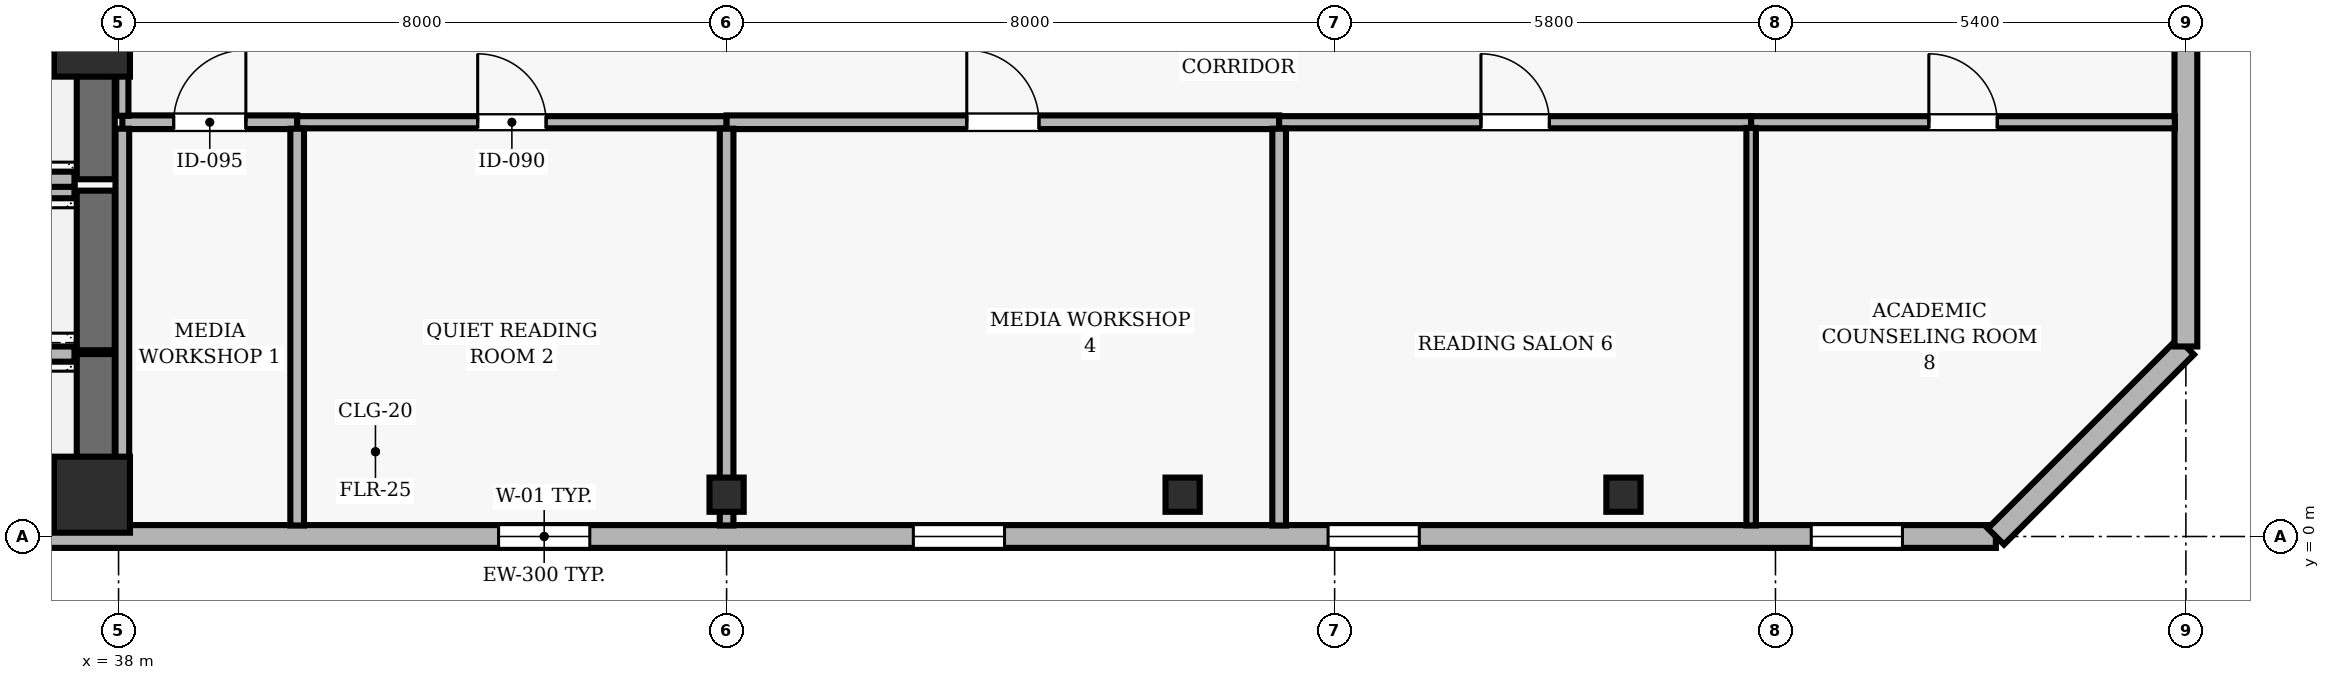
"""IFC4 building model, lengths in metres.
Left out: names, types, materials, properties, quantities, classifications, styles, units other than length and angle.
Written with IfcOpenShell. Run it as: python <this file> out.ifc"""

import sys

from ifc_helpers import new_model, si_unit, direction, frame, frame_2d, origin, origin_2d, place, context, subcontext, project, spatial, rectangle, hollow_rectangle, extrude, element, fill, save


model = new_model("IFC4")
c1 = context("Model", 3, precision=1e-05, world=origin(), true_north=direction((0.0, 1.0)))
c2 = subcontext(c1, "Body", "Model", "MODEL_VIEW")
j1 = project(units=[si_unit("LENGTHUNIT", "METRE"), si_unit("PLANEANGLEUNIT", "RADIAN")], contexts=[c1])
p1 = place(None, origin())
s1 = spatial("IfcSite", under=j1, at=p1, CompositionType="ELEMENT")
p2 = place(p1, origin())
s2 = spatial("IfcBuilding", under=s1, at=p2, CompositionType="ELEMENT")
p3 = place(p2, frame((0.0, 0.0, 199.2)))
s3 = spatial("IfcBuildingStorey", under=s2, at=p3, CompositionType="ELEMENT", Elevation=199.2)
for number, where, z_axis, x_axis in (
    (1, (37.65, 0.55, 0.0), (0.0, 0.0, 1.0), (1.0, 0.0, 0.0)),
    (2, (37.65, 6.55, 0.0), (0.0, 0.0, 1.0), (1.0, 0.0, 0.0)),
):
    element("IfcColumn", number, at=place(p3, frame(where, z_axis=z_axis, x_axis=x_axis)), inside=s3, PredefinedType="COLUMN", context=c2, shape_type="SweptSolid", body=[
        extrude(rectangle(XDim=1.0, YDim=1.0, at=origin_2d()), origin(), (0.0, 0.0, 1.0), 3.9),
    ])
for number, where, z_axis, x_axis in (
    (3, (46.0, 0.55, 0.0), (0.0, 0.0, 1.0), (1.0, 0.0, 0.0)),
    (4, (52.0, 0.55, 0.0), (0.0, 0.0, 1.0), (1.0, 0.0, 0.0)),
    (5, (57.8, 0.55, 0.0), (0.0, 0.0, 1.0), (1.0, 0.0, 0.0)),
):
    element("IfcColumn", number, at=place(p3, frame(where, z_axis=z_axis, x_axis=x_axis)), inside=s3, PredefinedType="COLUMN", context=c2, shape_type="SweptSolid", body=[
        extrude(hollow_rectangle(XDim=0.45, YDim=0.45, WallThickness=0.02, at=origin_2d()), origin(), (0.0, 0.0, 1.0), 3.9),
    ])
p4 = place(p3, frame((24.5, 0.0, 0.0), z_axis=(0.0, 0.0, 1.0), x_axis=(1.0, 0.0, 0.0)))
e6 = element("IfcWall", 6, at=p4, inside=s3, PredefinedType="SOLIDWALL", context=c2, shape_type="SweptSolid", body=[
    extrude(rectangle(XDim=38.2, YDim=0.3, at=frame_2d((19.1, 0.0))), origin(), (0.0, 0.0, 1.0), 3.69),
])
p5 = place(p4, frame((2.129, 0.0, 0.9)))
e7 = element("IfcOpeningElement", 7, at=p5, cuts=e6, PredefinedType="OPENING", context=c2, shape_type="SweptSolid", body=[
    extrude(rectangle(XDim=1.2, YDim=1.6, at=frame_2d((0.6, 0.8))), frame((0.0, 0.16, 0.0), z_axis=(0.0, -1.0, 0.0), x_axis=(1.0, 0.0, 0.0)), (0.0, 0.0, 1.0), 0.32),
])
p6 = place(p4, frame((8.036, 0.0, 0.9)))
e8 = element("IfcOpeningElement", 8, at=p6, cuts=e6, PredefinedType="OPENING", context=c2, shape_type="SweptSolid", body=[
    extrude(rectangle(XDim=1.2, YDim=1.6, at=frame_2d((0.6, 0.8))), frame((0.0, 0.16, 0.0), z_axis=(0.0, -1.0, 0.0), x_axis=(1.0, 0.0, 0.0)), (0.0, 0.0, 1.0), 0.32),
])
p7 = place(p4, frame((18.5, 0.0, 0.9)))
e9 = element("IfcOpeningElement", 9, at=p7, cuts=e6, PredefinedType="OPENING", context=c2, shape_type="SweptSolid", body=[
    extrude(rectangle(XDim=1.2, YDim=1.6, at=frame_2d((0.6, 0.8))), frame((0.0, 0.16, 0.0), z_axis=(0.0, -1.0, 0.0), x_axis=(1.0, 0.0, 0.0)), (0.0, 0.0, 1.0), 0.32),
])
p8 = place(p4, frame((23.957, 0.0, 0.9)))
e10 = element("IfcOpeningElement", 10, at=p8, cuts=e6, PredefinedType="OPENING", context=c2, shape_type="SweptSolid", body=[
    extrude(rectangle(XDim=1.2, YDim=1.6, at=frame_2d((0.6, 0.8))), frame((0.0, 0.16, 0.0), z_axis=(0.0, -1.0, 0.0), x_axis=(1.0, 0.0, 0.0)), (0.0, 0.0, 1.0), 0.32),
])
p9 = place(p4, frame((29.414, 0.0, 0.9)))
e11 = element("IfcOpeningElement", 11, at=p9, cuts=e6, PredefinedType="OPENING", context=c2, shape_type="SweptSolid", body=[
    extrude(rectangle(XDim=1.2, YDim=1.6, at=frame_2d((0.6, 0.8))), frame((0.0, 0.16, 0.0), z_axis=(0.0, -1.0, 0.0), x_axis=(1.0, 0.0, 0.0)), (0.0, 0.0, 1.0), 0.32),
])
p10 = place(p4, frame((35.771, 0.0, 0.9)))
e12 = element("IfcOpeningElement", 12, at=p10, cuts=e6, PredefinedType="OPENING", context=c2, shape_type="SweptSolid", body=[
    extrude(rectangle(XDim=1.2, YDim=1.6, at=frame_2d((0.6, 0.8))), frame((0.0, 0.16, 0.0), z_axis=(0.0, -1.0, 0.0), x_axis=(1.0, 0.0, 0.0)), (0.0, 0.0, 1.0), 0.32),
])
p11 = place(p3, frame((62.7, 0.0, 0.0), z_axis=(0.0, 0.0, 1.0), x_axis=(0.707106781187, 0.707106781187, 0.0)))
e13 = element("IfcWall", 13, at=p11, inside=s3, PredefinedType="SOLIDWALL", context=c2, shape_type="SweptSolid", body=[
    extrude(rectangle(XDim=3.536, YDim=0.3, at=frame_2d((1.768, 0.0))), origin(), (0.0, 0.0, 1.0), 3.69),
])
p12 = place(p3, frame((65.2, 2.5, 0.0), z_axis=(0.0, 0.0, 1.0), x_axis=(0.0, 1.0, 0.0)))
e14 = element("IfcWall", 14, at=p12, inside=s3, PredefinedType="SOLIDWALL", context=c2, shape_type="SweptSolid", body=[
    extrude(rectangle(XDim=11.0, YDim=0.3, at=frame_2d((5.5, 0.0))), origin(), (0.0, 0.0, 1.0), 3.69),
])
p13 = place(p12, frame((7.35, 0.0, 0.9)))
e15 = element("IfcOpeningElement", 15, at=p13, cuts=e14, PredefinedType="OPENING", context=c2, shape_type="SweptSolid", body=[
    extrude(rectangle(XDim=1.8, YDim=1.6, at=frame_2d((0.9, 0.8))), frame((0.0, 0.16, 0.0), z_axis=(0.0, -1.0, 0.0), x_axis=(1.0, 0.0, 0.0)), (0.0, 0.0, 1.0), 0.32),
])
p14 = place(p3, frame((37.7, 0.3, 0.0), z_axis=(0.0, 0.0, 1.0), x_axis=(0.0, 1.0, 0.0)))
e16 = element("IfcWall", 16, at=p14, inside=s3, PredefinedType="SHEAR", context=c2, shape_type="SweptSolid", body=[
    extrude(rectangle(XDim=2.1, YDim=0.5, at=frame_2d((1.05, 0.0))), origin(), (0.0, 0.0, 1.0), 3.69),
])
for number, where, z_axis, x_axis in (
    (17, (35.28, 0.3, 0.0), (0.0, 0.0, 1.0), (1.0, 0.0, 0.0)),
    (18, (37.42, 2.4, 0.0), (0.0, 0.0, 1.0), (-1.0, 0.0, 0.0)),
):
    element("IfcWall", number, at=place(p3, frame(where, z_axis=z_axis, x_axis=x_axis)), inside=s3, PredefinedType="SOLIDWALL", context=c2, shape_type="SweptSolid", body=[
        extrude(rectangle(XDim=2.14, YDim=0.2, at=frame_2d((1.07, 0.0))), origin(), (0.0, 0.0, 1.0), 3.69),
    ])
p15 = place(p3, frame((37.7, 2.45, 0.0), z_axis=(0.0, 0.0, 1.0), x_axis=(0.0, 1.0, 0.0)))
e19 = element("IfcWall", 19, at=p15, inside=s3, PredefinedType="SHEAR", context=c2, shape_type="SweptSolid", body=[
    extrude(rectangle(XDim=2.1, YDim=0.5, at=frame_2d((1.05, 0.0))), origin(), (0.0, 0.0, 1.0), 3.69),
])
p16 = place(p3, frame((37.42, 4.55, 0.0), z_axis=(0.0, 0.0, 1.0), x_axis=(-1.0, 0.0, 0.0)))
e20 = element("IfcWall", 20, at=p16, inside=s3, PredefinedType="SOLIDWALL", context=c2, shape_type="SweptSolid", body=[
    extrude(rectangle(XDim=2.14, YDim=0.2, at=frame_2d((1.07, 0.0))), origin(), (0.0, 0.0, 1.0), 3.69),
])
p17 = place(p3, frame((37.7, 4.7, 0.0), z_axis=(0.0, 0.0, 1.0), x_axis=(0.0, 1.0, 0.0)))
e21 = element("IfcWall", 21, at=p17, inside=s3, PredefinedType="SHEAR", context=c2, shape_type="SweptSolid", body=[
    extrude(rectangle(XDim=2.25, YDim=0.5, at=frame_2d((1.125, 0.0))), origin(), (0.0, 0.0, 1.0), 3.69),
])
p18 = place(p3, frame((35.28, 4.7, 0.0), z_axis=(0.0, 0.0, 1.0), x_axis=(1.0, 0.0, 0.0)))
e22 = element("IfcWall", 22, at=p18, inside=s3, PredefinedType="SOLIDWALL", context=c2, shape_type="SweptSolid", body=[
    extrude(rectangle(XDim=2.14, YDim=0.2, at=frame_2d((1.07, 0.0))), origin(), (0.0, 0.0, 1.0), 3.69),
])
p19 = place(p3, frame((38.05, 5.45, 0.0), z_axis=(0.0, 0.0, 1.0), x_axis=(1.0, 0.0, 0.0)))
e23 = element("IfcWall", 23, at=p19, inside=s3, PredefinedType="PARTITIONING", context=c2, shape_type="SweptSolid", body=[
    extrude(rectangle(XDim=2.3, YDim=0.18, at=frame_2d((1.15, 0.0))), origin(), (0.0, 0.0, 1.0), 3.343),
])
p20 = place(p19, frame((0.675, 0.0, 0.0)))
e24 = element("IfcOpeningElement", 24, at=p20, cuts=e23, PredefinedType="OPENING", context=c2, shape_type="SweptSolid", body=[
    extrude(rectangle(XDim=0.95, YDim=2.1, at=frame_2d((0.475, 1.05))), frame((0.0, 0.1, 0.0), z_axis=(0.0, -1.0, 0.0), x_axis=(1.0, 0.0, 0.0)), (0.0, 0.0, 1.0), 0.2),
])
p21 = place(p3, frame((40.35, 5.45, 0.0), z_axis=(0.0, 0.0, 1.0), x_axis=(1.0, 0.0, 0.0)))
e25 = element("IfcWall", 25, at=p21, inside=s3, PredefinedType="PARTITIONING", context=c2, shape_type="SweptSolid", body=[
    extrude(rectangle(XDim=5.65, YDim=0.16, at=frame_2d((2.825, 0.0))), origin(), (0.0, 0.0, 1.0), 3.343),
])
p22 = place(p21, frame((2.375, 0.0, 0.0)))
e26 = element("IfcOpeningElement", 26, at=p22, cuts=e25, PredefinedType="OPENING", context=c2, shape_type="SweptSolid", body=[
    extrude(rectangle(XDim=0.9, YDim=2.1, at=frame_2d((0.45, 1.05))), frame((0.0, 0.09, 0.0), z_axis=(0.0, -1.0, 0.0), x_axis=(1.0, 0.0, 0.0)), (0.0, 0.0, 1.0), 0.18),
])
p23 = place(p3, frame((46.0, 5.45, 0.0), z_axis=(0.0, 0.0, 1.0), x_axis=(1.0, 0.0, 0.0)))
e27 = element("IfcWall", 27, at=p23, inside=s3, PredefinedType="PARTITIONING", context=c2, shape_type="SweptSolid", body=[
    extrude(rectangle(XDim=7.27, YDim=0.18, at=frame_2d((3.635, 0.0))), origin(), (0.0, 0.0, 1.0), 3.343),
])
p24 = place(p23, frame((3.16, 0.0, 0.0)))
e28 = element("IfcOpeningElement", 28, at=p24, cuts=e27, PredefinedType="OPENING", context=c2, shape_type="SweptSolid", body=[
    extrude(rectangle(XDim=0.95, YDim=2.1, at=frame_2d((0.475, 1.05))), frame((0.0, 0.1, 0.0), z_axis=(0.0, -1.0, 0.0), x_axis=(1.0, 0.0, 0.0)), (0.0, 0.0, 1.0), 0.2),
])
p25 = place(p3, frame((53.27, 5.45, 0.0), z_axis=(0.0, 0.0, 1.0), x_axis=(1.0, 0.0, 0.0)))
e29 = element("IfcWall", 29, at=p25, inside=s3, PredefinedType="PARTITIONING", context=c2, shape_type="SweptSolid", body=[
    extrude(rectangle(XDim=6.21, YDim=0.16, at=frame_2d((3.105, 0.0))), origin(), (0.0, 0.0, 1.0), 3.343),
])
p26 = place(p25, frame((2.655, 0.0, 0.0)))
e30 = element("IfcOpeningElement", 30, at=p26, cuts=e29, PredefinedType="OPENING", context=c2, shape_type="SweptSolid", body=[
    extrude(rectangle(XDim=0.9, YDim=2.1, at=frame_2d((0.45, 1.05))), frame((0.0, 0.09, 0.0), z_axis=(0.0, -1.0, 0.0), x_axis=(1.0, 0.0, 0.0)), (0.0, 0.0, 1.0), 0.18),
])
p27 = place(p3, frame((59.48, 5.45, 0.0), z_axis=(0.0, 0.0, 1.0), x_axis=(1.0, 0.0, 0.0)))
e31 = element("IfcWall", 31, at=p27, inside=s3, PredefinedType="PARTITIONING", context=c2, shape_type="SweptSolid", body=[
    extrude(rectangle(XDim=5.575, YDim=0.16, at=frame_2d((2.788, 0.0))), origin(), (0.0, 0.0, 1.0), 3.69),
])
p28 = place(p27, frame((2.338, 0.0, 0.0)))
e32 = element("IfcOpeningElement", 32, at=p28, cuts=e31, PredefinedType="OPENING", context=c2, shape_type="SweptSolid", body=[
    extrude(rectangle(XDim=0.9, YDim=2.1, at=frame_2d((0.45, 1.05))), frame((0.0, 0.09, 0.0), z_axis=(0.0, -1.0, 0.0), x_axis=(1.0, 0.0, 0.0)), (0.0, 0.0, 1.0), 0.18),
])
p29 = place(p3, frame((38.05, 5.365, 0.0), z_axis=(0.0, 0.0, 1.0), x_axis=(0.0, -1.0, 0.0)))
e33 = element("IfcWall", 33, at=p29, inside=s3, PredefinedType="PARTITIONING", context=c2, shape_type="SweptSolid", body=[
    extrude(rectangle(XDim=5.22, YDim=0.18, at=frame_2d((2.61, 0.0))), origin(), (0.0, 0.0, 1.0), 3.139),
])
p30 = place(p3, frame((38.05, 7.05, 0.0), z_axis=(0.0, 0.0, 1.0), x_axis=(0.0, -1.0, 0.0)))
e34 = element("IfcWall", 34, at=p30, inside=s3, PredefinedType="PARTITIONING", context=c2, shape_type="SweptSolid", body=[
    extrude(rectangle(XDim=1.515, YDim=0.16, at=frame_2d((0.758, 0.0))), origin(), (0.0, 0.0, 1.0), 3.139),
])
p31 = place(p3, frame((40.35, 0.145, 0.0), z_axis=(0.0, 0.0, 1.0), x_axis=(0.0, 1.0, 0.0)))
e35 = element("IfcWall", 35, at=p31, inside=s3, PredefinedType="PARTITIONING", context=c2, shape_type="SweptSolid", body=[
    extrude(rectangle(XDim=5.22, YDim=0.18, at=frame_2d((2.61, 0.0))), origin(), (0.0, 0.0, 1.0), 3.69),
])
p32 = place(p3, frame((46.0, 0.145, 0.0), z_axis=(0.0, 0.0, 1.0), x_axis=(0.0, 1.0, 0.0)))
e36 = element("IfcWall", 36, at=p32, inside=s3, PredefinedType="PARTITIONING", context=c2, shape_type="SweptSolid", body=[
    extrude(rectangle(XDim=5.22, YDim=0.18, at=frame_2d((2.61, 0.0))), origin(), (0.0, 0.0, 1.0), 3.139),
])
p33 = place(p3, frame((53.27, 0.145, 0.0), z_axis=(0.0, 0.0, 1.0), x_axis=(0.0, 1.0, 0.0)))
e37 = element("IfcWall", 37, at=p33, inside=s3, PredefinedType="PARTITIONING", context=c2, shape_type="SweptSolid", body=[
    extrude(rectangle(XDim=5.22, YDim=0.18, at=frame_2d((2.61, 0.0))), origin(), (0.0, 0.0, 1.0), 3.69),
])
p34 = place(p3, frame((59.48, 0.145, 0.0), z_axis=(0.0, 0.0, 1.0), x_axis=(0.0, 1.0, 0.0)))
e38 = element("IfcWall", 38, at=p34, inside=s3, PredefinedType="PARTITIONING", context=c2, shape_type="SweptSolid", body=[
    extrude(rectangle(XDim=5.23, YDim=0.125, at=frame_2d((2.615, 0.0))), origin(), (0.0, 0.0, 1.0), 3.69),
])
p35 = place(p7, origin())
e39 = element("IfcWindow", 39, at=p35, inside=s3, PartitioningType="SINGLE_PANEL", PredefinedType="WINDOW", context=c2, shape_type="SweptSolid", body=[
    extrude(rectangle(XDim=1.2, YDim=1.6, at=frame_2d((0.6, 0.8))), frame((0.0, 0.03, 0.0), z_axis=(0.0, -1.0, 0.0), x_axis=(1.0, 0.0, 0.0)), (0.0, 0.0, 1.0), 0.06),
])
fill(e9, e39)
p36 = place(p8, origin())
e40 = element("IfcWindow", 40, at=p36, inside=s3, PartitioningType="SINGLE_PANEL", PredefinedType="WINDOW", context=c2, shape_type="SweptSolid", body=[
    extrude(rectangle(XDim=1.2, YDim=1.6, at=frame_2d((0.6, 0.8))), frame((0.0, 0.03, 0.0), z_axis=(0.0, -1.0, 0.0), x_axis=(1.0, 0.0, 0.0)), (0.0, 0.0, 1.0), 0.06),
])
fill(e10, e40)
p37 = place(p9, origin())
e41 = element("IfcWindow", 41, at=p37, inside=s3, PartitioningType="SINGLE_PANEL", PredefinedType="WINDOW", context=c2, shape_type="SweptSolid", body=[
    extrude(rectangle(XDim=1.2, YDim=1.6, at=frame_2d((0.6, 0.8))), frame((0.0, 0.03, 0.0), z_axis=(0.0, -1.0, 0.0), x_axis=(1.0, 0.0, 0.0)), (0.0, 0.0, 1.0), 0.06),
])
fill(e11, e41)
p38 = place(p10, origin())
e42 = element("IfcWindow", 42, at=p38, inside=s3, PartitioningType="SINGLE_PANEL", PredefinedType="WINDOW", context=c2, shape_type="SweptSolid", body=[
    extrude(rectangle(XDim=1.2, YDim=1.6, at=frame_2d((0.6, 0.8))), frame((0.0, 0.03, 0.0), z_axis=(0.0, -1.0, 0.0), x_axis=(1.0, 0.0, 0.0)), (0.0, 0.0, 1.0), 0.06),
])
fill(e12, e42)
p39 = place(p20, origin())
e43 = element("IfcDoor", 43, at=p39, inside=s3, OperationType="SINGLE_SWING_RIGHT", PredefinedType="DOOR", context=c2, shape_type="SweptSolid", body=[
    extrude(rectangle(XDim=0.95, YDim=2.1, at=frame_2d((0.475, 1.05))), frame((0.0, 0.025, 0.0), z_axis=(0.0, -1.0, 0.0), x_axis=(1.0, 0.0, 0.0)), (0.0, 0.0, 1.0), 0.05),
])
fill(e24, e43)
p40 = place(p22, origin())
e44 = element("IfcDoor", 44, at=p40, inside=s3, OperationType="SINGLE_SWING_LEFT", PredefinedType="DOOR", context=c2, shape_type="SweptSolid", body=[
    extrude(rectangle(XDim=0.9, YDim=2.1, at=frame_2d((0.45, 1.05))), frame((0.0, 0.025, 0.0), z_axis=(0.0, -1.0, 0.0), x_axis=(1.0, 0.0, 0.0)), (0.0, 0.0, 1.0), 0.05),
])
fill(e26, e44)
p41 = place(p24, origin())
e45 = element("IfcDoor", 45, at=p41, inside=s3, OperationType="SINGLE_SWING_LEFT", PredefinedType="DOOR", context=c2, shape_type="SweptSolid", body=[
    extrude(rectangle(XDim=0.95, YDim=2.1, at=frame_2d((0.475, 1.05))), frame((0.0, 0.025, 0.0), z_axis=(0.0, -1.0, 0.0), x_axis=(1.0, 0.0, 0.0)), (0.0, 0.0, 1.0), 0.05),
])
fill(e28, e45)
p42 = place(p26, origin())
e46 = element("IfcDoor", 46, at=p42, inside=s3, OperationType="SINGLE_SWING_LEFT", PredefinedType="DOOR", context=c2, shape_type="SweptSolid", body=[
    extrude(rectangle(XDim=0.9, YDim=2.1, at=frame_2d((0.45, 1.05))), frame((0.0, 0.025, 0.0), z_axis=(0.0, -1.0, 0.0), x_axis=(1.0, 0.0, 0.0)), (0.0, 0.0, 1.0), 0.05),
])
fill(e30, e46)
p43 = place(p28, origin())
e47 = element("IfcDoor", 47, at=p43, inside=s3, OperationType="SINGLE_SWING_LEFT", PredefinedType="DOOR", context=c2, shape_type="SweptSolid", body=[
    extrude(rectangle(XDim=0.9, YDim=2.1, at=frame_2d((0.45, 1.05))), frame((0.0, 0.025, 0.0), z_axis=(0.0, -1.0, 0.0), x_axis=(1.0, 0.0, 0.0)), (0.0, 0.0, 1.0), 0.05),
])
fill(e32, e47)
save(model, sys.argv[1])
